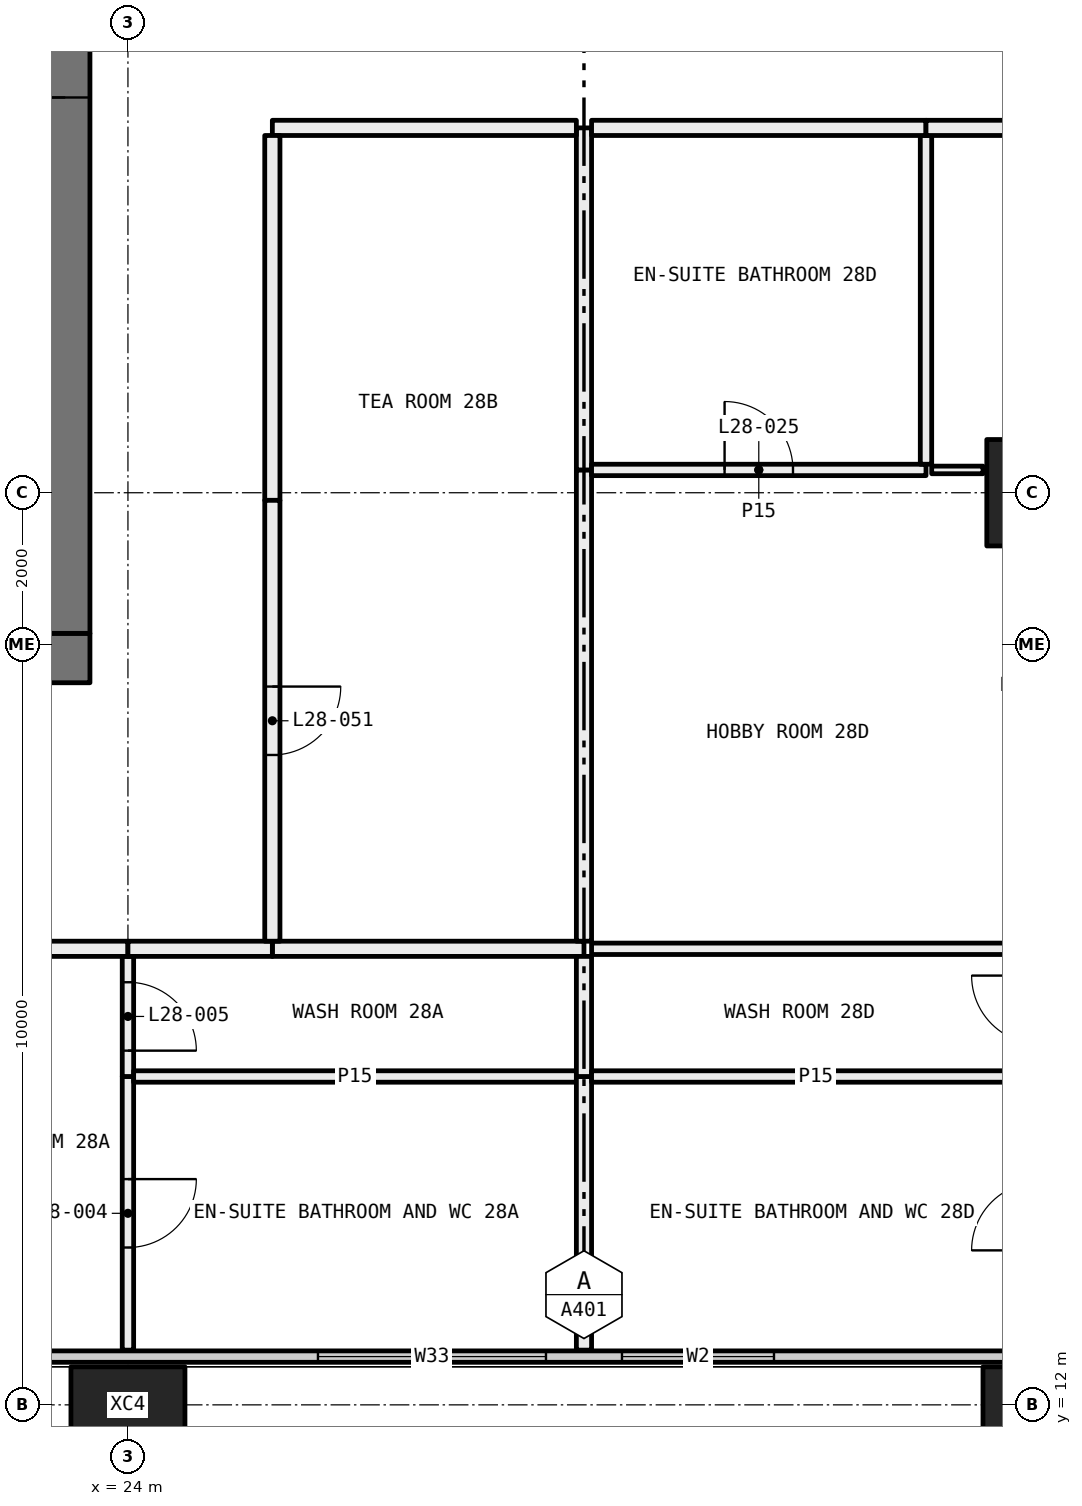
"""IFC4 building model, lengths in metres.
Left out: names, types, materials, properties, quantities, classifications, styles, units other than length and angle.
Written with IfcOpenShell. Run it as: python <this file> out.ifc"""

import sys

from ifc_helpers import new_model, si_unit, direction, frame, frame_2d, origin, origin_2d, place, context, subcontext, project, spatial, rectangle, hollow_rectangle, extrude, element, fill, save


model = new_model("IFC4")
c1 = context("Model", 3, precision=1e-05, world=origin(), true_north=direction((0.0, 1.0)))
c2 = subcontext(c1, "Body", "Model", "MODEL_VIEW")
j1 = project(units=[si_unit("LENGTHUNIT", "METRE"), si_unit("PLANEANGLEUNIT", "RADIAN")], contexts=[c1])
p1 = place(None, origin())
s1 = spatial("IfcSite", under=j1, at=p1, CompositionType="ELEMENT")
p2 = place(p1, origin())
s2 = spatial("IfcBuilding", under=s1, at=p2, CompositionType="ELEMENT")
p3 = place(p2, frame((0.0, 0.0, 110.4)))
s3 = spatial("IfcBuildingStorey", under=s2, at=p3, CompositionType="ELEMENT", Elevation=110.4)
for number, where, z_axis, x_axis in (
    (1, (24.0, 12.0, -0.4), (0.0, 0.0, 1.0), (1.0, 0.0, 0.0)),
    (2, (36.0, 12.0, -0.4), (0.0, 0.0, 1.0), (1.0, 0.0, 0.0)),
):
    element("IfcColumn", number, at=place(p3, frame(where, z_axis=z_axis, x_axis=x_axis)), inside=s3, PredefinedType="COLUMN", context=c2, shape_type="SweptSolid", body=[
        extrude(hollow_rectangle(XDim=1.5, YDim=1.0, WallThickness=0.06, at=origin_2d()), origin(), (0.0, 0.0, 1.0), 3.45),
    ])
p4 = place(p3, frame((36.0, 24.0, 0.0), z_axis=(0.0, 0.0, 1.0), x_axis=(1.0, 0.0, 0.0)))
e3 = element("IfcColumn", 3, at=p4, inside=s3, PredefinedType="COLUMN", context=c2, shape_type="SweptSolid", body=[
    extrude(hollow_rectangle(XDim=1.4, YDim=1.4, WallThickness=0.06, at=origin_2d()), origin(), (0.0, 0.0, 1.0), 3.05),
])
p5 = place(p3, frame((6.56, 12.635, 0.0), z_axis=(0.0, 0.0, 1.0), x_axis=(1.0, 0.0, 0.0)))
e4 = element("IfcWall", 4, at=p5, inside=s3, PredefinedType="ELEMENTEDWALL", context=c2, shape_type="SweptSolid", body=[
    extrude(rectangle(XDim=58.88, YDim=0.15, at=frame_2d((29.44, 0.0))), origin(), (0.0, 0.0, 1.0), 3.05),
])
p6 = place(p5, frame((0.44, 0.0, 0.45)))
e5 = element("IfcOpeningElement", 5, at=p6, cuts=e4, PredefinedType="OPENING", context=c2, shape_type="SweptSolid", body=[
    extrude(rectangle(XDim=4.5, YDim=2.55, at=frame_2d((2.25, 1.275))), frame((0.0, 0.085, 0.0), z_axis=(0.0, -1.0, 0.0), x_axis=(1.0, 0.0, 0.0)), (0.0, 0.0, 1.0), 0.17),
])
p7 = place(p5, frame((7.94, 0.0, 0.45)))
e6 = element("IfcOpeningElement", 6, at=p7, cuts=e4, PredefinedType="OPENING", context=c2, shape_type="SweptSolid", body=[
    extrude(rectangle(XDim=3.0, YDim=2.55, at=frame_2d((1.5, 1.275))), frame((0.0, 0.085, 0.0), z_axis=(0.0, -1.0, 0.0), x_axis=(1.0, 0.0, 0.0)), (0.0, 0.0, 1.0), 0.17),
])
p8 = place(p5, frame((11.94, 0.0, 0.45)))
e7 = element("IfcOpeningElement", 7, at=p8, cuts=e4, PredefinedType="OPENING", context=c2, shape_type="SweptSolid", body=[
    extrude(rectangle(XDim=3.0, YDim=2.55, at=frame_2d((1.5, 1.275))), frame((0.0, 0.085, 0.0), z_axis=(0.0, -1.0, 0.0), x_axis=(1.0, 0.0, 0.0)), (0.0, 0.0, 1.0), 0.17),
])
p9 = place(p5, frame((19.94, 0.0, 0.45)))
e8 = element("IfcOpeningElement", 8, at=p9, cuts=e4, PredefinedType="OPENING", context=c2, shape_type="SweptSolid", body=[
    extrude(rectangle(XDim=3.0, YDim=2.55, at=frame_2d((1.5, 1.275))), frame((0.0, 0.085, 0.0), z_axis=(0.0, -1.0, 0.0), x_axis=(1.0, 0.0, 0.0)), (0.0, 0.0, 1.0), 0.17),
])
p10 = place(p5, frame((23.94, 0.0, 0.45)))
e9 = element("IfcOpeningElement", 9, at=p10, cuts=e4, PredefinedType="OPENING", context=c2, shape_type="SweptSolid", body=[
    extrude(rectangle(XDim=2.0, YDim=2.55, at=frame_2d((1.0, 1.275))), frame((0.0, 0.085, 0.0), z_axis=(0.0, -1.0, 0.0), x_axis=(1.0, 0.0, 0.0)), (0.0, 0.0, 1.0), 0.17),
])
p11 = place(p5, frame((31.94, 0.0, 0.45)))
e10 = element("IfcOpeningElement", 10, at=p11, cuts=e4, PredefinedType="OPENING", context=c2, shape_type="SweptSolid", body=[
    extrude(rectangle(XDim=3.0, YDim=2.55, at=frame_2d((1.5, 1.275))), frame((0.0, 0.085, 0.0), z_axis=(0.0, -1.0, 0.0), x_axis=(1.0, 0.0, 0.0)), (0.0, 0.0, 1.0), 0.17),
])
p12 = place(p5, frame((35.94, 0.0, 0.45)))
e11 = element("IfcOpeningElement", 11, at=p12, cuts=e4, PredefinedType="OPENING", context=c2, shape_type="SweptSolid", body=[
    extrude(rectangle(XDim=3.0, YDim=2.55, at=frame_2d((1.5, 1.275))), frame((0.0, 0.085, 0.0), z_axis=(0.0, -1.0, 0.0), x_axis=(1.0, 0.0, 0.0)), (0.0, 0.0, 1.0), 0.17),
])
p13 = place(p5, frame((43.94, 0.0, 0.45)))
e12 = element("IfcOpeningElement", 12, at=p13, cuts=e4, PredefinedType="OPENING", context=c2, shape_type="SweptSolid", body=[
    extrude(rectangle(XDim=3.0, YDim=2.55, at=frame_2d((1.5, 1.275))), frame((0.0, 0.085, 0.0), z_axis=(0.0, -1.0, 0.0), x_axis=(1.0, 0.0, 0.0)), (0.0, 0.0, 1.0), 0.17),
])
p14 = place(p5, frame((47.94, 0.0, 0.45)))
e13 = element("IfcOpeningElement", 13, at=p14, cuts=e4, PredefinedType="OPENING", context=c2, shape_type="SweptSolid", body=[
    extrude(rectangle(XDim=2.0, YDim=2.55, at=frame_2d((1.0, 1.275))), frame((0.0, 0.085, 0.0), z_axis=(0.0, -1.0, 0.0), x_axis=(1.0, 0.0, 0.0)), (0.0, 0.0, 1.0), 0.17),
])
p15 = place(p5, frame((53.94, 0.0, 0.45)))
e14 = element("IfcOpeningElement", 14, at=p15, cuts=e4, PredefinedType="OPENING", context=c2, shape_type="SweptSolid", body=[
    extrude(rectangle(XDim=4.5, YDim=2.55, at=frame_2d((2.25, 1.275))), frame((0.0, 0.085, 0.0), z_axis=(0.0, -1.0, 0.0), x_axis=(1.0, 0.0, 0.0)), (0.0, 0.0, 1.0), 0.17),
])
p16 = place(p3, frame((24.0, 12.72, 0.0), z_axis=(0.0, 0.0, 1.0), x_axis=(0.0, 1.0, 0.0)))
e15 = element("IfcWall", 15, at=p16, inside=s3, PredefinedType="PARTITIONING", context=c2, shape_type="SweptSolid", body=[
    extrude(rectangle(XDim=3.6, YDim=0.15, at=frame_2d((1.8, 0.0))), origin(), (0.0, 0.0, 1.0), 3.05),
])
p17 = place(p16, frame((1.35, 0.0, 0.0)))
e16 = element("IfcOpeningElement", 16, at=p17, cuts=e15, PredefinedType="OPENING", context=c2, shape_type="SweptSolid", body=[
    extrude(rectangle(XDim=0.9, YDim=2.1, at=frame_2d((0.45, 1.05))), frame((0.0, 0.085, 0.0), z_axis=(0.0, -1.0, 0.0), x_axis=(1.0, 0.0, 0.0)), (0.0, 0.0, 1.0), 0.17),
])
p18 = place(p3, frame((24.0, 16.32, 0.0), z_axis=(0.0, 0.0, 1.0), x_axis=(0.0, 1.0, 0.0)))
e17 = element("IfcWall", 17, at=p18, inside=s3, PredefinedType="PARTITIONING", context=c2, shape_type="SweptSolid", body=[
    extrude(rectangle(XDim=1.58, YDim=0.15, at=frame_2d((0.79, 0.0))), origin(), (0.0, 0.0, 1.0), 3.05),
])
p19 = place(p18, frame((0.34, 0.0, 0.0)))
e18 = element("IfcOpeningElement", 18, at=p19, cuts=e17, PredefinedType="OPENING", context=c2, shape_type="SweptSolid", body=[
    extrude(rectangle(XDim=0.9, YDim=2.1, at=frame_2d((0.45, 1.05))), frame((0.0, 0.085, 0.0), z_axis=(0.0, -1.0, 0.0), x_axis=(1.0, 0.0, 0.0)), (0.0, 0.0, 1.0), 0.17),
])
p20 = place(p3, frame((24.0, 18.0, 0.0), z_axis=(0.0, 0.0, 1.0), x_axis=(-1.0, 0.0, 0.0)))
e19 = element("IfcWall", 19, at=p20, inside=s3, PredefinedType="PARTITIONING", context=c2, shape_type="SweptSolid", body=[
    extrude(rectangle(XDim=6.0, YDim=0.2, at=frame_2d((3.0, 0.0))), origin(), (0.0, 0.0, 1.0), 3.05),
])
p21 = place(p3, frame((29.9, 16.32, 0.0), z_axis=(0.0, 0.0, 1.0), x_axis=(-1.0, 0.0, 0.0)))
e20 = element("IfcWall", 20, at=p21, inside=s3, PredefinedType="PARTITIONING", context=c2, shape_type="SweptSolid", body=[
    extrude(rectangle(XDim=5.825, YDim=0.15, at=frame_2d((2.913, 0.0))), origin(), (0.0, 0.0, 1.0), 3.05),
])
p22 = place(p3, frame((30.0, 12.72, 0.0), z_axis=(0.0, 0.0, 1.0), x_axis=(0.0, 1.0, 0.0)))
e21 = element("IfcWall", 21, at=p22, inside=s3, PredefinedType="PARTITIONING", context=c2, shape_type="SweptSolid", body=[
    extrude(rectangle(XDim=3.6, YDim=0.2, at=frame_2d((1.8, 0.0))), origin(), (0.0, 0.0, 1.0), 3.05),
])
p23 = place(p3, frame((30.0, 18.0, 0.0), z_axis=(0.0, 0.0, 1.0), x_axis=(-1.0, 0.0, 0.0)))
e22 = element("IfcWall", 22, at=p23, inside=s3, PredefinedType="PARTITIONING", context=c2, shape_type="SweptSolid", body=[
    extrude(rectangle(XDim=4.1, YDim=0.2, at=frame_2d((2.05, 0.0))), origin(), (0.0, 0.0, 1.0), 3.05),
])
p24 = place(p3, frame((30.0, 16.32, 0.0), z_axis=(0.0, 0.0, 1.0), x_axis=(0.0, 1.0, 0.0)))
e23 = element("IfcWall", 23, at=p24, inside=s3, PredefinedType="PARTITIONING", context=c2, shape_type="SweptSolid", body=[
    extrude(rectangle(XDim=1.58, YDim=0.2, at=frame_2d((0.79, 0.0))), origin(), (0.0, 0.0, 1.0), 3.05),
])
p25 = place(p3, frame((25.9, 18.0, 0.0), z_axis=(0.0, 0.0, 1.0), x_axis=(-1.0, 0.0, 0.0)))
e24 = element("IfcWall", 24, at=p25, inside=s3, PredefinedType="PARTITIONING", context=c2, shape_type="SweptSolid", body=[
    extrude(rectangle(XDim=1.9, YDim=0.2, at=frame_2d((0.95, 0.0))), origin(), (0.0, 0.0, 1.0), 3.05),
])
p26 = place(p3, frame((30.0, 18.1, 0.0), z_axis=(0.0, 0.0, 1.0), x_axis=(0.0, 1.0, 0.0)))
e25 = element("IfcWall", 25, at=p26, inside=s3, PredefinedType="PARTITIONING", context=c2, shape_type="SweptSolid", body=[
    extrude(rectangle(XDim=6.2, YDim=0.2, at=frame_2d((3.1, 0.0))), origin(), (0.0, 0.0, 1.0), 2.45),
])
p27 = place(p3, frame((30.0, 24.3, 0.0), z_axis=(0.0, 0.0, 1.0), x_axis=(0.0, 1.0, 0.0)))
e26 = element("IfcWall", 26, at=p27, inside=s3, PredefinedType="PARTITIONING", context=c2, shape_type="SweptSolid", body=[
    extrude(rectangle(XDim=4.5, YDim=0.2, at=frame_2d((2.25, 0.0))), origin(), (0.0, 0.0, 1.0), 3.05),
])
p28 = place(p3, frame((29.9, 28.8, 0.0), z_axis=(0.0, 0.0, 1.0), x_axis=(-1.0, 0.0, 0.0)))
e27 = element("IfcWall", 27, at=p28, inside=s3, PredefinedType="PARTITIONING", context=c2, shape_type="SweptSolid", body=[
    extrude(rectangle(XDim=4.0, YDim=0.2, at=frame_2d((2.0, 0.0))), origin(), (0.0, 0.0, 1.0), 3.05),
])
p29 = place(p3, frame((25.9, 28.7, 0.0), z_axis=(0.0, 0.0, 1.0), x_axis=(0.0, -1.0, 0.0)))
e28 = element("IfcWall", 28, at=p29, inside=s3, PredefinedType="PARTITIONING", context=c2, shape_type="SweptSolid", body=[
    extrude(rectangle(XDim=4.8, YDim=0.2, at=frame_2d((2.4, 0.0))), origin(), (0.0, 0.0, 1.0), 2.45),
])
p30 = place(p3, frame((25.9, 23.9, 0.0), z_axis=(0.0, 0.0, 1.0), x_axis=(0.0, -1.0, 0.0)))
e29 = element("IfcWall", 29, at=p30, inside=s3, PredefinedType="PARTITIONING", context=c2, shape_type="SweptSolid", body=[
    extrude(rectangle(XDim=5.8, YDim=0.2, at=frame_2d((2.9, 0.0))), origin(), (0.0, 0.0, 1.0), 3.05),
])
p31 = place(p30, frame((2.45, 0.0, 0.0)))
e30 = element("IfcOpeningElement", 30, at=p31, cuts=e29, PredefinedType="OPENING", context=c2, shape_type="SweptSolid", body=[
    extrude(rectangle(XDim=0.9, YDim=2.1, at=frame_2d((0.45, 1.05))), frame((0.0, 0.11, 0.0), z_axis=(0.0, -1.0, 0.0), x_axis=(1.0, 0.0, 0.0)), (0.0, 0.0, 1.0), 0.22),
])
p32 = place(p3, frame((36.0, 16.32, 0.0), z_axis=(0.0, 0.0, 1.0), x_axis=(-1.0, 0.0, 0.0)))
e31 = element("IfcWall", 31, at=p32, inside=s3, PredefinedType="PARTITIONING", context=c2, shape_type="SweptSolid", body=[
    extrude(rectangle(XDim=5.9, YDim=0.15, at=frame_2d((2.95, 0.0))), origin(), (0.0, 0.0, 1.0), 2.45),
])
p33 = place(p3, frame((35.925, 18.0, 0.0), z_axis=(0.0, 0.0, 1.0), x_axis=(-1.0, 0.0, 0.0)))
e32 = element("IfcWall", 32, at=p33, inside=s3, PredefinedType="PARTITIONING", context=c2, shape_type="SweptSolid", body=[
    extrude(rectangle(XDim=5.825, YDim=0.15, at=frame_2d((2.913, 0.0))), origin(), (0.0, 0.0, 1.0), 2.45),
])
p34 = place(p3, frame((34.5, 24.3, 0.0), z_axis=(0.0, 0.0, 1.0), x_axis=(-1.0, 0.0, 0.0)))
e33 = element("IfcWall", 33, at=p34, inside=s3, PredefinedType="PARTITIONING", context=c2, shape_type="SweptSolid", body=[
    extrude(rectangle(XDim=4.4, YDim=0.15, at=frame_2d((2.2, 0.0))), origin(), (0.0, 0.0, 1.0), 3.05),
])
p35 = place(p34, frame((1.75, 0.0, 0.0)))
e34 = element("IfcOpeningElement", 34, at=p35, cuts=e33, PredefinedType="OPENING", context=c2, shape_type="SweptSolid", body=[
    extrude(rectangle(XDim=0.9, YDim=2.1, at=frame_2d((0.45, 1.05))), frame((0.0, 0.085, 0.0), z_axis=(0.0, -1.0, 0.0), x_axis=(1.0, 0.0, 0.0)), (0.0, 0.0, 1.0), 0.17),
])
p36 = place(p3, frame((35.25, 24.3, 0.0), z_axis=(0.0, 0.0, 1.0), x_axis=(-1.0, 0.0, 0.0)))
e35 = element("IfcWall", 35, at=p36, inside=s3, PredefinedType="PARTITIONING", context=c2, shape_type="SweptSolid", body=[
    extrude(rectangle(XDim=0.675, YDim=0.1, at=frame_2d((0.337, 0.0))), origin(), (0.0, 0.0, 1.0), 3.05),
])
p37 = place(p3, frame((34.5, 24.375, 0.0), z_axis=(0.0, 0.0, 1.0), x_axis=(0.0, 1.0, 0.0)))
e36 = element("IfcWall", 36, at=p37, inside=s3, PredefinedType="PARTITIONING", context=c2, shape_type="SweptSolid", body=[
    extrude(rectangle(XDim=4.325, YDim=0.15, at=frame_2d((2.163, 0.0))), origin(), (0.0, 0.0, 1.0), 3.05),
])
p38 = place(p3, frame((34.5, 28.8, 0.0), z_axis=(0.0, 0.0, 1.0), x_axis=(-1.0, 0.0, 0.0)))
e37 = element("IfcWall", 37, at=p38, inside=s3, PredefinedType="PARTITIONING", context=c2, shape_type="SweptSolid", body=[
    extrude(rectangle(XDim=4.4, YDim=0.2, at=frame_2d((2.2, 0.0))), origin(), (0.0, 0.0, 1.0), 3.05),
])
p39 = place(p3, frame((35.9, 28.8, 0.0), z_axis=(0.0, 0.0, 1.0), x_axis=(-1.0, 0.0, 0.0)))
e38 = element("IfcWall", 38, at=p39, inside=s3, PredefinedType="PARTITIONING", context=c2, shape_type="SweptSolid", body=[
    extrude(rectangle(XDim=1.4, YDim=0.2, at=frame_2d((0.7, 0.0))), origin(), (0.0, 0.0, 1.0), 3.05),
])
p40 = place(p3, frame((12.5, 21.825, 0.0), z_axis=(0.0, 0.0, 1.0), x_axis=(1.0, 0.0, 0.0)))
e39 = element("IfcWall", 39, at=p40, inside=s3, PredefinedType="SHEAR", context=c2, shape_type="SweptSolid", body=[
    extrude(rectangle(XDim=11.0, YDim=0.65, at=frame_2d((5.5, 0.0))), origin(), (0.0, 0.0, 1.0), 3.05),
])
p41 = place(p3, frame((23.175, 22.15, 0.0), z_axis=(0.0, 0.0, 1.0), x_axis=(0.0, 1.0, 0.0)))
e40 = element("IfcWall", 40, at=p41, inside=s3, PredefinedType="SHEAR", context=c2, shape_type="SweptSolid", body=[
    extrude(rectangle(XDim=15.7, YDim=0.65, at=frame_2d((7.85, 0.0))), origin(), (0.0, 0.0, 1.0), 3.05),
])
p42 = place(p41, frame((7.05, 0.0, 0.0)))
e41 = element("IfcOpeningElement", 41, at=p42, cuts=e40, PredefinedType="OPENING", context=c2, shape_type="SweptSolid", body=[
    extrude(rectangle(XDim=1.6, YDim=2.1, at=frame_2d((0.8, 1.05))), frame((0.0, 0.335, 0.0), z_axis=(0.0, -1.0, 0.0), x_axis=(1.0, 0.0, 0.0)), (0.0, 0.0, 1.0), 0.67),
])
p43 = place(p9, origin())
e42 = element("IfcWindow", 42, at=p43, inside=s3, PartitioningType="SINGLE_PANEL", PredefinedType="WINDOW", context=c2, shape_type="SweptSolid", body=[
    extrude(rectangle(XDim=3.0, YDim=2.55, at=frame_2d((1.5, 1.275))), frame((0.0, 0.03, 0.0), z_axis=(0.0, -1.0, 0.0), x_axis=(1.0, 0.0, 0.0)), (0.0, 0.0, 1.0), 0.06),
])
fill(e8, e42)
p44 = place(p10, origin())
e43 = element("IfcWindow", 43, at=p44, inside=s3, PartitioningType="SINGLE_PANEL", PredefinedType="WINDOW", context=c2, shape_type="SweptSolid", body=[
    extrude(rectangle(XDim=2.0, YDim=2.55, at=frame_2d((1.0, 1.275))), frame((0.0, 0.03, 0.0), z_axis=(0.0, -1.0, 0.0), x_axis=(1.0, 0.0, 0.0)), (0.0, 0.0, 1.0), 0.06),
])
fill(e9, e43)
p45 = place(p17, frame((0.9, 0.0, 0.0), x_axis=(-1.0, 0.0, 0.0)))
e44 = element("IfcDoor", 44, at=p45, inside=s3, OperationType="SINGLE_SWING_RIGHT", PredefinedType="DOOR", context=c2, shape_type="SweptSolid", body=[
    extrude(rectangle(XDim=0.9, YDim=2.1, at=frame_2d((0.45, 1.05))), frame((0.0, 0.025, 0.0), z_axis=(0.0, -1.0, 0.0), x_axis=(1.0, 0.0, 0.0)), (0.0, 0.0, 1.0), 0.05),
])
fill(e16, e44)
p46 = place(p19, frame((0.9, 0.0, 0.0), x_axis=(-1.0, 0.0, 0.0)))
e45 = element("IfcDoor", 45, at=p46, inside=s3, OperationType="SINGLE_SWING_LEFT", PredefinedType="DOOR", context=c2, shape_type="SweptSolid", body=[
    extrude(rectangle(XDim=0.9, YDim=2.1, at=frame_2d((0.45, 1.05))), frame((0.0, 0.025, 0.0), z_axis=(0.0, -1.0, 0.0), x_axis=(1.0, 0.0, 0.0)), (0.0, 0.0, 1.0), 0.05),
])
fill(e18, e45)
p47 = place(p35, frame((0.9, 0.0, 0.0), x_axis=(-1.0, 0.0, 0.0)))
e46 = element("IfcDoor", 46, at=p47, inside=s3, OperationType="SINGLE_SWING_RIGHT", PredefinedType="DOOR", context=c2, shape_type="SweptSolid", body=[
    extrude(rectangle(XDim=0.9, YDim=2.1, at=frame_2d((0.45, 1.05))), frame((0.0, 0.025, 0.0), z_axis=(0.0, -1.0, 0.0), x_axis=(1.0, 0.0, 0.0)), (0.0, 0.0, 1.0), 0.05),
])
fill(e34, e46)
p48 = place(p31, origin())
e47 = element("IfcDoor", 47, at=p48, inside=s3, OperationType="SINGLE_SWING_RIGHT", PredefinedType="DOOR", context=c2, shape_type="SweptSolid", body=[
    extrude(rectangle(XDim=0.9, YDim=2.1, at=frame_2d((0.45, 1.05))), frame((0.0, 0.025, 0.0), z_axis=(0.0, -1.0, 0.0), x_axis=(1.0, 0.0, 0.0)), (0.0, 0.0, 1.0), 0.05),
])
fill(e30, e47)
p49 = place(p42, origin())
e48 = element("IfcDoor", 48, at=p49, inside=s3, OperationType="DOUBLE_DOOR_SINGLE_SWING", PredefinedType="DOOR", context=c2, shape_type="SweptSolid", body=[
    extrude(rectangle(XDim=1.6, YDim=2.1, at=frame_2d((0.8, 1.05))), frame((0.0, 0.025, 0.0), z_axis=(0.0, -1.0, 0.0), x_axis=(1.0, 0.0, 0.0)), (0.0, 0.0, 1.0), 0.05),
])
fill(e41, e48)
save(model, sys.argv[1])
